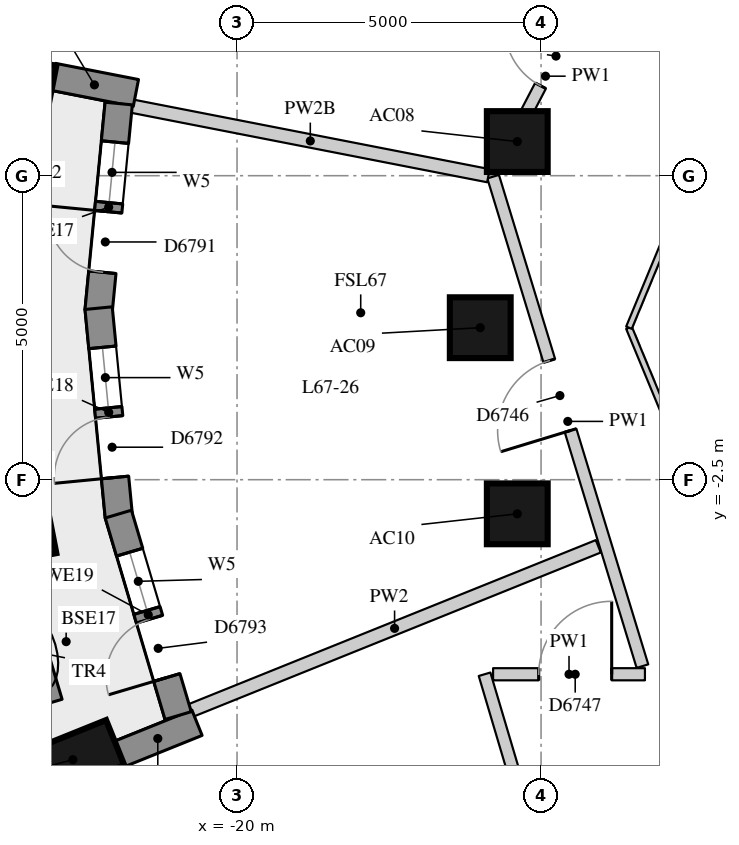
"""IFC4 building model, lengths in metres.
Left out: names, types, materials, properties, quantities, classifications, styles, units other than length and angle.
Written with IfcOpenShell. Run it as: python <this file> out.ifc"""

import sys

from ifc_helpers import new_model, si_unit, direction, frame, frame_2d, origin, origin_2d, place, context, subcontext, project, spatial, rectangle, extrude, element, fill, save


model = new_model("IFC4")
c1 = context("Model", 3, precision=1e-05, world=origin(), true_north=direction((0.0, 1.0)))
c2 = subcontext(c1, "Body", "Model", "MODEL_VIEW")
j1 = project(units=[si_unit("LENGTHUNIT", "METRE"), si_unit("PLANEANGLEUNIT", "RADIAN")], contexts=[c1])
p1 = place(None, origin())
s1 = spatial("IfcSite", under=j1, at=p1, CompositionType="ELEMENT")
p2 = place(p1, origin())
s2 = spatial("IfcBuilding", under=s1, at=p2, CompositionType="ELEMENT")
p3 = place(p2, frame((0.0, 0.0, 236.6)))
s3 = spatial("IfcBuildingStorey", under=s2, at=p3, CompositionType="ELEMENT", Elevation=236.6)
for number, where, z_axis, x_axis in (
    (1, (-23.785, 4.06, 0.0), (0.0, 0.0, 1.0), (-0.981, 0.192, 0.0)),
    (2, (-23.785, -3.459, 0.0), (0.0, 0.0, 1.0), (-0.981, -0.192, 0.0)),
    (3, (-22.7, -7.105, 0.0), (0.0, 0.0, 1.0), (-0.928, -0.374, 0.0)),
):
    element("IfcColumn", number, at=place(p3, frame(where, z_axis=z_axis, x_axis=x_axis)), inside=s3, PredefinedType="COLUMN", context=c2, shape_type="SweptSolid", body=[
        extrude(rectangle(XDim=1.5, YDim=0.8, at=origin_2d()), origin(), (0.0, 0.0, 1.0), 3.3),
    ])
for number, where, z_axis, x_axis in (
    (4, (-15.391, 3.062, 0.0), (0.0, 0.0, 1.0), (1.0, 0.0, 0.0)),
    (5, (-16.0, 0.0, 0.0), (0.0, 0.0, 1.0), (1.0, 0.0, 0.0)),
    (6, (-15.391, -3.062, 0.0), (0.0, 0.0, 1.0), (1.0, 0.0, 0.0)),
):
    element("IfcColumn", number, at=place(p3, frame(where, z_axis=z_axis, x_axis=x_axis)), inside=s3, PredefinedType="COLUMN", context=c2, shape_type="SweptSolid", body=[
        extrude(rectangle(XDim=1.0, YDim=1.0, at=origin_2d()), origin(), (0.0, 0.0, 1.0), 3.3),
    ])
p4 = place(p3, frame((-23.028, 4.127, 0.0), z_axis=(0.0, 0.0, 1.0), x_axis=(0.981468844755, -0.191621780535, 0.0)))
e7 = element("IfcWall", 7, at=p4, inside=s3, PredefinedType="SOLIDWALL", context=c2, shape_type="SweptSolid", body=[
    extrude(rectangle(XDim=1.39, YDim=0.45, at=frame_2d((0.695, 0.0))), origin(), (0.0, 0.0, 1.0), 2.57),
])
p5 = place(p3, frame((-21.948, -7.017, 0.0), z_axis=(0.0, 0.0, 1.0), x_axis=(0.927577935879, 0.373629726964, 0.0)))
e8 = element("IfcWall", 8, at=p5, inside=s3, PredefinedType="SOLIDWALL", context=c2, shape_type="SweptSolid", body=[
    extrude(rectangle(XDim=1.39, YDim=0.45, at=frame_2d((0.695, 0.0))), origin(), (0.0, 0.0, 1.0), 3.02),
])
p6 = place(p3, frame((-21.946, 3.687, 0.0), z_axis=(0.0, 0.0, 1.0), x_axis=(-0.096467747711, -0.995336110895, 0.0)))
e9 = element("IfcWall", 9, at=p6, inside=s3, PredefinedType="SOLIDWALL", context=c2, shape_type="SweptSolid", body=[
    extrude(rectangle(XDim=3.424, YDim=0.45, at=frame_2d((1.712, 0.0))), origin(), (0.0, 0.0, 1.0), 3.02),
])
p7 = place(p6, frame((0.637, 0.0, 0.4)))
e10 = element("IfcOpeningElement", 10, at=p7, cuts=e9, PredefinedType="OPENING", context=c2, shape_type="SweptSolid", body=[
    extrude(rectangle(XDim=1.0, YDim=1.75, at=frame_2d((0.5, 0.875))), frame((0.0, 0.235, 0.0), z_axis=(0.0, -1.0, 0.0), x_axis=(1.0, 0.0, 0.0)), (0.0, 0.0, 1.0), 0.47),
])
p8 = place(p6, frame((1.787, 0.0, 0.0)))
e11 = element("IfcOpeningElement", 11, at=p8, cuts=e9, PredefinedType="OPENING", context=c2, shape_type="SweptSolid", body=[
    extrude(rectangle(XDim=1.0, YDim=2.15, at=frame_2d((0.5, 1.075))), frame((0.0, 0.235, 0.0), z_axis=(0.0, -1.0, 0.0), x_axis=(1.0, 0.0, 0.0)), (0.0, 0.0, 1.0), 0.47),
])
p9 = place(p3, frame((-22.276, 0.322, 0.0), z_axis=(0.0, 0.0, 1.0), x_axis=(0.096423819494, -0.995340367429, 0.0)))
e12 = element("IfcWall", 12, at=p9, inside=s3, PredefinedType="SOLIDWALL", context=c2, shape_type="SweptSolid", body=[
    extrude(rectangle(XDim=3.446, YDim=0.45, at=frame_2d((1.723, 0.0))), origin(), (0.0, 0.0, 1.0), 3.02),
])
p10 = place(p9, frame((0.648, 0.0, 0.4)))
e13 = element("IfcOpeningElement", 13, at=p10, cuts=e12, PredefinedType="OPENING", context=c2, shape_type="SweptSolid", body=[
    extrude(rectangle(XDim=1.0, YDim=1.75, at=frame_2d((0.5, 0.875))), frame((0.0, 0.235, 0.0), z_axis=(0.0, -1.0, 0.0), x_axis=(1.0, 0.0, 0.0)), (0.0, 0.0, 1.0), 0.47),
])
p11 = place(p9, frame((1.798, 0.0, 0.0)))
e14 = element("IfcOpeningElement", 14, at=p11, cuts=e12, PredefinedType="OPENING", context=c2, shape_type="SweptSolid", body=[
    extrude(rectangle(XDim=1.0, YDim=2.15, at=frame_2d((0.5, 1.075))), frame((0.0, 0.235, 0.0), z_axis=(0.0, -1.0, 0.0), x_axis=(1.0, 0.0, 0.0)), (0.0, 0.0, 1.0), 0.47),
])
p12 = place(p3, frame((-21.952, -3.066, 0.0), z_axis=(0.0, 0.0, 1.0), x_axis=(0.284437019833, -0.958694728132, 0.0)))
e15 = element("IfcWall", 15, at=p12, inside=s3, PredefinedType="SOLIDWALL", context=c2, shape_type="SweptSolid", body=[
    extrude(rectangle(XDim=3.457, YDim=0.45, at=frame_2d((1.728, 0.0))), origin(), (0.0, 0.0, 1.0), 3.02),
])
p13 = place(p12, frame((0.653, 0.0, 0.4)))
e16 = element("IfcOpeningElement", 16, at=p13, cuts=e15, PredefinedType="OPENING", context=c2, shape_type="SweptSolid", body=[
    extrude(rectangle(XDim=1.0, YDim=1.75, at=frame_2d((0.5, 0.875))), frame((0.0, 0.235, 0.0), z_axis=(0.0, -1.0, 0.0), x_axis=(1.0, 0.0, 0.0)), (0.0, 0.0, 1.0), 0.47),
])
p14 = place(p12, frame((1.803, 0.0, 0.0)))
e17 = element("IfcOpeningElement", 17, at=p14, cuts=e15, PredefinedType="OPENING", context=c2, shape_type="SweptSolid", body=[
    extrude(rectangle(XDim=1.0, YDim=2.15, at=frame_2d((0.5, 1.075))), frame((0.0, 0.235, 0.0), z_axis=(0.0, -1.0, 0.0), x_axis=(1.0, 0.0, 0.0)), (0.0, 0.0, 1.0), 0.47),
])
p15 = place(p3, frame((-23.726, -4.486, 0.0), z_axis=(0.0, 0.0, 1.0), x_axis=(0.285219480859, -0.958462230731, 0.0)))
e18 = element("IfcWall", 18, at=p15, inside=s3, PredefinedType="USERDEFINED", context=c2, shape_type="SweptSolid", body=[
    extrude(rectangle(XDim=1.8, YDim=0.7, at=frame_2d((0.9, 0.0))), origin(), (0.0, 0.0, 1.0), 0.75),
])
p16 = place(p3, frame((-14.815, -9.452, 0.0), z_axis=(0.0, 0.0, 1.0), x_axis=(-0.284600079658, 0.958646334504, 0.0)))
e19 = element("IfcWall", 19, at=p16, inside=s3, PredefinedType="PARTITIONING", context=c2, shape_type="SweptSolid", body=[
    extrude(rectangle(XDim=3.914, YDim=0.2, at=frame_2d((1.957, 0.0))), origin(), (0.0, 0.0, 1.0), 3.02),
])
p17 = place(p3, frame((-15.789, -5.7, 0.0), z_axis=(0.0, 0.0, 1.0), x_axis=(1.0, 0.0, 0.0)))
e20 = element("IfcWall", 20, at=p17, inside=s3, PredefinedType="PARTITIONING", context=c2, shape_type="SweptSolid", body=[
    extrude(rectangle(XDim=2.497, YDim=0.2, at=frame_2d((1.249, 0.0))), origin(), (0.0, 0.0, 1.0), 3.02),
])
p18 = place(p17, frame((0.75, 0.0, 0.0)))
e21 = element("IfcOpeningElement", 21, at=p18, cuts=e20, PredefinedType="OPENING", context=c2, shape_type="SweptSolid", body=[
    extrude(rectangle(XDim=1.2, YDim=2.1, at=frame_2d((0.6, 1.05))), frame((0.0, 0.11, 0.0), z_axis=(0.0, -1.0, 0.0), x_axis=(1.0, 0.0, 0.0)), (0.0, 0.0, 1.0), 0.22),
])
p19 = place(p3, frame((-13.333, -5.567, 0.0), z_axis=(0.0, 0.0, 1.0), x_axis=(-0.291732883234, 0.956499830026, 0.0)))
e22 = element("IfcWall", 22, at=p19, inside=s3, PredefinedType="PARTITIONING", context=c2, shape_type="SweptSolid", body=[
    extrude(rectangle(XDim=8.417, YDim=0.2, at=frame_2d((4.208, 0.0))), origin(), (0.0, 0.0, 1.0), 3.02),
])
p20 = place(p19, frame((4.053, 0.0, 0.0)))
e23 = element("IfcOpeningElement", 23, at=p20, cuts=e22, PredefinedType="OPENING", context=c2, shape_type="SweptSolid", body=[
    extrude(rectangle(XDim=1.2, YDim=2.1, at=frame_2d((0.6, 1.05))), frame((0.0, 0.11, 0.0), z_axis=(0.0, -1.0, 0.0), x_axis=(1.0, 0.0, 0.0)), (0.0, 0.0, 1.0), 0.22),
])
p21 = place(p3, frame((-15.742, 2.573, 0.0), z_axis=(0.0, 0.0, 1.0), x_axis=(0.462435860297, 0.886652736482, 0.0)))
e24 = element("IfcWall", 24, at=p21, inside=s3, PredefinedType="PARTITIONING", context=c2, shape_type="SweptSolid", body=[
    extrude(rectangle(XDim=3.526, YDim=0.2, at=frame_2d((1.763, 0.0))), origin(), (0.0, 0.0, 1.0), 3.02),
])
p22 = place(p21, frame((1.586, 0.0, 0.0)))
e25 = element("IfcOpeningElement", 25, at=p22, cuts=e24, PredefinedType="OPENING", context=c2, shape_type="SweptSolid", body=[
    extrude(rectangle(XDim=1.1, YDim=2.1, at=frame_2d((0.55, 1.05))), frame((0.0, 0.11, 0.0), z_axis=(0.0, -1.0, 0.0), x_axis=(1.0, 0.0, 0.0)), (0.0, 0.0, 1.0), 0.22),
])
p23 = place(p3, frame((-21.724, 3.643, 0.0), z_axis=(0.0, 0.0, 1.0), x_axis=(0.981479525595, -0.191567066159, 0.0)))
e26 = element("IfcWall", 26, at=p23, inside=s3, PredefinedType="PARTITIONING", context=c2, shape_type="SweptSolid", body=[
    extrude(rectangle(XDim=5.968, YDim=0.22, at=frame_2d((2.984, 0.0))), origin(), (0.0, 0.0, 1.0), 2.57),
])
p24 = place(p3, frame((-20.759, -6.295, 0.0), z_axis=(0.0, 0.0, 1.0), x_axis=(0.927536731172, 0.373732006023, 0.0)))
e27 = element("IfcWall", 27, at=p24, inside=s3, PredefinedType="PARTITIONING", context=c2, shape_type="SweptSolid", body=[
    extrude(rectangle(XDim=7.224, YDim=0.22, at=frame_2d((3.612, 0.0))), origin(), (0.0, 0.0, 1.0), 3.02),
])
for number, where, z_axis, x_axis in (
    (28, (-11.927, -3.927, 0.0), (0.0, 0.0, 1.0), (-0.383, 0.924, 0.0)),
    (29, (-13.554, 0.0, 0.0), (0.0, 0.0, 1.0), (0.383, 0.924, 0.0)),
):
    element("IfcWall", number, at=place(p3, frame(where, z_axis=z_axis, x_axis=x_axis)), inside=s3, PredefinedType="PARTITIONING", context=c2, shape_type="SweptSolid", body=[
        extrude(rectangle(XDim=4.251, YDim=0.1, at=frame_2d((2.125, 0.0))), origin(), (0.0, 0.0, 1.0), 3.02),
    ])
p25 = place(p7, origin())
e30 = element("IfcWindow", 30, at=p25, inside=s3, PartitioningType="SINGLE_PANEL", PredefinedType="WINDOW", context=c2, shape_type="SweptSolid", body=[
    extrude(rectangle(XDim=1.0, YDim=1.75, at=frame_2d((0.5, 0.875))), frame((0.0, 0.035, 0.0), z_axis=(0.0, -1.0, 0.0), x_axis=(1.0, 0.0, 0.0)), (0.0, 0.0, 1.0), 0.06),
])
fill(e10, e30)
p26 = place(p8, frame((1.0, 0.0, 0.0), z_axis=(0.0, 0.0, 1.0), x_axis=(-1.0, 0.0, 0.0)))
e31 = element("IfcDoor", 31, at=p26, inside=s3, OperationType="SINGLE_SWING_RIGHT", PredefinedType="DOOR", context=c2, shape_type="SweptSolid", body=[
    extrude(rectangle(XDim=1.0, YDim=2.15, at=frame_2d((0.5, 1.075))), frame((0.0, 0.075, 0.0), z_axis=(0.0, -1.0, 0.0), x_axis=(1.0, 0.0, 0.0)), (0.0, 0.0, 1.0), 0.05),
])
fill(e11, e31)
p27 = place(p10, origin())
e32 = element("IfcWindow", 32, at=p27, inside=s3, PartitioningType="SINGLE_PANEL", PredefinedType="WINDOW", context=c2, shape_type="SweptSolid", body=[
    extrude(rectangle(XDim=1.0, YDim=1.75, at=frame_2d((0.5, 0.875))), frame((0.0, 0.035, 0.0), z_axis=(0.0, -1.0, 0.0), x_axis=(1.0, 0.0, 0.0)), (0.0, 0.0, 1.0), 0.06),
])
fill(e13, e32)
p28 = place(p11, frame((1.0, 0.0, 0.0), z_axis=(0.0, 0.0, 1.0), x_axis=(-1.0, 0.0, 0.0)))
e33 = element("IfcDoor", 33, at=p28, inside=s3, OperationType="SINGLE_SWING_LEFT", PredefinedType="DOOR", context=c2, shape_type="SweptSolid", body=[
    extrude(rectangle(XDim=1.0, YDim=2.15, at=frame_2d((0.5, 1.075))), frame((0.0, 0.075, 0.0), z_axis=(0.0, -1.0, 0.0), x_axis=(1.0, 0.0, 0.0)), (0.0, 0.0, 1.0), 0.05),
])
fill(e14, e33)
p29 = place(p13, origin())
e34 = element("IfcWindow", 34, at=p29, inside=s3, PartitioningType="SINGLE_PANEL", PredefinedType="WINDOW", context=c2, shape_type="SweptSolid", body=[
    extrude(rectangle(XDim=1.0, YDim=1.75, at=frame_2d((0.5, 0.875))), frame((0.0, 0.035, 0.0), z_axis=(0.0, -1.0, 0.0), x_axis=(1.0, 0.0, 0.0)), (0.0, 0.0, 1.0), 0.06),
])
fill(e16, e34)
p30 = place(p14, frame((1.0, 0.0, 0.0), z_axis=(0.0, 0.0, 1.0), x_axis=(-1.0, 0.0, 0.0)))
e35 = element("IfcDoor", 35, at=p30, inside=s3, OperationType="SINGLE_SWING_LEFT", PredefinedType="DOOR", context=c2, shape_type="SweptSolid", body=[
    extrude(rectangle(XDim=1.0, YDim=2.15, at=frame_2d((0.5, 1.075))), frame((0.0, 0.075, 0.0), z_axis=(0.0, -1.0, 0.0), x_axis=(1.0, 0.0, 0.0)), (0.0, 0.0, 1.0), 0.05),
])
fill(e17, e35)
p31 = place(p22, origin())
e36 = element("IfcDoor", 36, at=p31, inside=s3, OperationType="SINGLE_SWING_RIGHT", PredefinedType="DOOR", context=c2, shape_type="SweptSolid", body=[
    extrude(rectangle(XDim=1.1, YDim=2.1, at=frame_2d((0.55, 1.05))), frame((0.0, 0.025, 0.0), z_axis=(0.0, -1.0, 0.0), x_axis=(1.0, 0.0, 0.0)), (0.0, 0.0, 1.0), 0.05),
])
fill(e25, e36)
p32 = place(p20, origin())
e37 = element("IfcDoor", 37, at=p32, inside=s3, OperationType="SINGLE_SWING_LEFT", PredefinedType="DOOR", context=c2, shape_type="SweptSolid", body=[
    extrude(rectangle(XDim=1.2, YDim=2.1, at=frame_2d((0.6, 1.05))), frame((0.0, 0.025, 0.0), z_axis=(0.0, -1.0, 0.0), x_axis=(1.0, 0.0, 0.0)), (0.0, 0.0, 1.0), 0.05),
])
fill(e23, e37)
p33 = place(p18, origin())
e38 = element("IfcDoor", 38, at=p33, inside=s3, OperationType="SINGLE_SWING_RIGHT", PredefinedType="DOOR", context=c2, shape_type="SweptSolid", body=[
    extrude(rectangle(XDim=1.2, YDim=2.1, at=frame_2d((0.6, 1.05))), frame((0.0, 0.025, 0.0), z_axis=(0.0, -1.0, 0.0), x_axis=(1.0, 0.0, 0.0)), (0.0, 0.0, 1.0), 0.05),
])
fill(e21, e38)
save(model, sys.argv[1])
